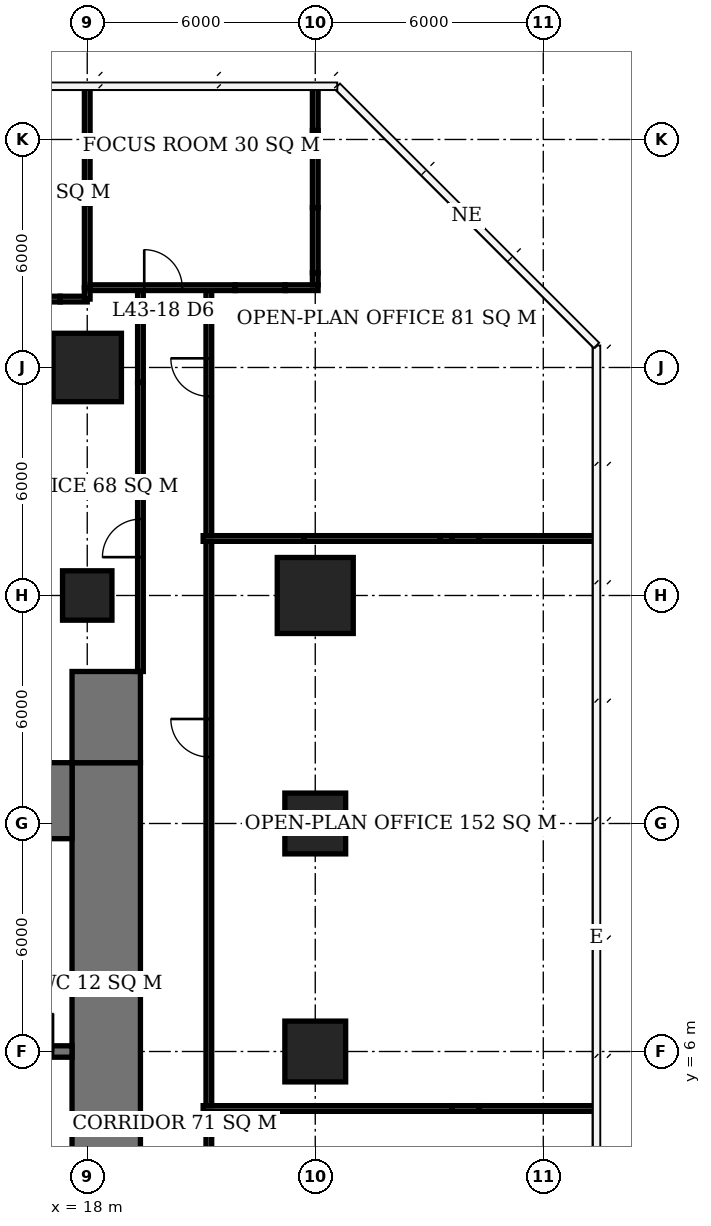
"""IFC4 building model, lengths in metres.
Left out: names, types, materials, properties, quantities, classifications, styles, units other than length and angle.
Written with IfcOpenShell. Run it as: python <this file> out.ifc"""

import sys

from ifc_helpers import new_model, si_unit, direction, frame, frame_2d, origin, origin_2d, place, context, subcontext, project, spatial, rectangle, extrude, element, fill, save


model = new_model("IFC4")
c1 = context("Model", 3, precision=1e-05, world=origin(), true_north=direction((0.0, 1.0)))
c2 = subcontext(c1, "Body", "Model", "MODEL_VIEW")
j1 = project(units=[si_unit("LENGTHUNIT", "METRE"), si_unit("PLANEANGLEUNIT", "RADIAN")], contexts=[c1])
p1 = place(None, origin())
s1 = spatial("IfcSite", under=j1, at=p1, CompositionType="ELEMENT")
p2 = place(p1, origin())
s2 = spatial("IfcBuilding", under=s1, at=p2, CompositionType="ELEMENT")
p3 = place(p2, frame((0.0, 0.0, 177.2)))
s3 = spatial("IfcBuildingStorey", under=s2, at=p3, CompositionType="ELEMENT", Elevation=177.2)
p4 = place(p3, frame((18.0, 18.0, 0.0), z_axis=(0.0, 0.0, 1.0), x_axis=(1.0, 0.0, 0.0)))
e1 = element("IfcColumn", 1, at=p4, inside=s3, PredefinedType="COLUMN", context=c2, shape_type="SweptSolid", body=[
    extrude(rectangle(XDim=1.3, YDim=1.3, at=origin_2d()), origin(), (0.0, 0.0, 1.0), 3.9),
])
p5 = place(p3, frame((18.0, 24.0, 0.0), z_axis=(0.0, 0.0, 1.0), x_axis=(1.0, 0.0, 0.0)))
e2 = element("IfcColumn", 2, at=p5, inside=s3, PredefinedType="COLUMN", context=c2, shape_type="SweptSolid", body=[
    extrude(rectangle(XDim=1.8, YDim=1.8, at=origin_2d()), origin(), (0.0, 0.0, 1.0), 3.9),
])
for number, where, z_axis, x_axis in (
    (3, (24.0, 6.0, 0.0), (0.0, 0.0, 1.0), (1.0, 0.0, 0.0)),
    (4, (24.0, 12.0, 0.0), (0.0, 0.0, 1.0), (1.0, 0.0, 0.0)),
):
    element("IfcColumn", number, at=place(p3, frame(where, z_axis=z_axis, x_axis=x_axis)), inside=s3, PredefinedType="COLUMN", context=c2, shape_type="SweptSolid", body=[
        extrude(rectangle(XDim=1.6, YDim=1.6, at=origin_2d()), origin(), (0.0, 0.0, 1.0), 3.9),
    ])
p6 = place(p3, frame((24.0, 18.0, 0.0), z_axis=(0.0, 0.0, 1.0), x_axis=(1.0, 0.0, 0.0)))
e5 = element("IfcColumn", 5, at=p6, inside=s3, PredefinedType="COLUMN", context=c2, shape_type="SweptSolid", body=[
    extrude(rectangle(XDim=2.0, YDim=2.0, at=origin_2d()), origin(), (0.0, 0.0, 1.0), 3.9),
])
p7 = place(p3, frame((-5.6, 12.6, 0.0), z_axis=(0.0, 0.0, 1.0), x_axis=(1.0, 0.0, 0.0)))
e6 = element("IfcWall", 6, at=p7, inside=s3, PredefinedType="SHEAR", context=c2, shape_type="SweptSolid", body=[
    extrude(rectangle(XDim=23.2, YDim=2.0, at=frame_2d((11.6, 0.0))), origin(), (0.0, 0.0, 1.0), 3.9),
])
p8 = place(p3, frame((18.5, -7.6, 0.0), z_axis=(0.0, 0.0, 1.0), x_axis=(0.0, 1.0, 0.0)))
e7 = element("IfcWall", 7, at=p8, inside=s3, PredefinedType="SHEAR", context=c2, shape_type="SweptSolid", body=[
    extrude(rectangle(XDim=21.2, YDim=1.8, at=frame_2d((10.6, 0.0))), origin(), (0.0, 0.0, 1.0), 3.9),
])
p9 = place(p8, frame((9.2, 0.0, 0.0)))
e8 = element("IfcOpeningElement", 8, at=p9, cuts=e7, PredefinedType="OPENING", context=c2, shape_type="SweptSolid", body=[
    extrude(rectangle(XDim=1.8, YDim=2.4, at=frame_2d((0.9, 1.2))), frame((0.0, 0.91, 0.0), z_axis=(0.0, -1.0, 0.0), x_axis=(1.0, 0.0, 0.0)), (0.0, 0.0, 1.0), 1.82),
])
p10 = place(p3, frame((18.5, 13.6, 0.0), z_axis=(0.0, 0.0, 1.0), x_axis=(0.0, 1.0, 0.0)))
e9 = element("IfcWall", 9, at=p10, inside=s3, PredefinedType="SHEAR", context=c2, shape_type="SweptSolid", body=[
    extrude(rectangle(XDim=2.4, YDim=1.8, at=frame_2d((1.2, 0.0))), origin(), (0.0, 0.0, 1.0), 3.9),
])
p11 = place(p3, frame((-0.15, 6.0, 0.0), z_axis=(0.0, 0.0, 1.0), x_axis=(1.0, 0.0, 0.0)))
e10 = element("IfcWall", 10, at=p11, inside=s3, PredefinedType="SHEAR", context=c2, shape_type="SweptSolid", body=[
    extrude(rectangle(XDim=17.75, YDim=0.3, at=frame_2d((8.875, 0.0))), origin(), (0.0, 0.0, 1.0), 3.9),
])
p12 = place(p11, frame((13.15, 0.0, 0.0)))
e11 = element("IfcOpeningElement", 11, at=p12, cuts=e10, PredefinedType="OPENING", context=c2, shape_type="SweptSolid", body=[
    extrude(rectangle(XDim=0.9, YDim=2.1, at=frame_2d((0.45, 1.05))), frame((0.0, 0.16, 0.0), z_axis=(0.0, -1.0, 0.0), x_axis=(1.0, 0.0, 0.0)), (0.0, 0.0, 1.0), 0.32),
])
p13 = place(p11, frame((16.25, 0.0, 0.0)))
e12 = element("IfcOpeningElement", 12, at=p13, cuts=e10, PredefinedType="OPENING", context=c2, shape_type="SweptSolid", body=[
    extrude(rectangle(XDim=1.0, YDim=2.1, at=frame_2d((0.5, 1.05))), frame((0.0, 0.16, 0.0), z_axis=(0.0, -1.0, 0.0), x_axis=(1.0, 0.0, 0.0)), (0.0, 0.0, 1.0), 0.32),
])
p14 = place(p11, frame((7.25, 0.0, 0.0)))
e13 = element("IfcOpeningElement", 13, at=p14, cuts=e10, PredefinedType="OPENING", context=c2, shape_type="SweptSolid", body=[
    extrude(rectangle(XDim=1.0, YDim=2.1, at=frame_2d((0.5, 1.05))), frame((0.0, 0.16, 0.0), z_axis=(0.0, -1.0, 0.0), x_axis=(1.0, 0.0, 0.0)), (0.0, 0.0, 1.0), 0.32),
])
p15 = place(p11, frame((1.1, 0.0, 0.0)))
e14 = element("IfcOpeningElement", 14, at=p15, cuts=e10, PredefinedType="OPENING", context=c2, shape_type="SweptSolid", body=[
    extrude(rectangle(XDim=1.1, YDim=2.1, at=frame_2d((0.55, 1.05))), frame((0.0, 0.16, 0.0), z_axis=(0.0, -1.0, 0.0), x_axis=(1.0, 0.0, 0.0)), (0.0, 0.0, 1.0), 0.32),
])
p16 = place(p11, frame((4.1, 0.0, 0.0)))
e15 = element("IfcOpeningElement", 15, at=p16, cuts=e10, PredefinedType="OPENING", context=c2, shape_type="SweptSolid", body=[
    extrude(rectangle(XDim=1.1, YDim=2.1, at=frame_2d((0.55, 1.05))), frame((0.0, 0.16, 0.0), z_axis=(0.0, -1.0, 0.0), x_axis=(1.0, 0.0, 0.0)), (0.0, 0.0, 1.0), 0.32),
])
p17 = place(p3, frame((12.71, 25.8, 0.0), z_axis=(0.0, 0.0, 1.0), x_axis=(1.0, 0.0, 0.0)))
e16 = element("IfcWall", 16, at=p17, inside=s3, PredefinedType="PARTITIONING", context=c2, shape_type="SweptSolid", body=[
    extrude(rectangle(XDim=4.58, YDim=0.15, at=frame_2d((2.29, 0.0))), origin(), (0.0, 0.0, 1.0), 3.65),
])
p18 = place(p17, frame((1.79, 0.0, 0.0)))
e17 = element("IfcOpeningElement", 17, at=p18, cuts=e16, PredefinedType="OPENING", context=c2, shape_type="SweptSolid", body=[
    extrude(rectangle(XDim=1.0, YDim=2.1, at=frame_2d((0.5, 1.05))), frame((0.0, 0.085, 0.0), z_axis=(0.0, -1.0, 0.0), x_axis=(1.0, 0.0, 0.0)), (0.0, 0.0, 1.0), 0.17),
])
p19 = place(p3, frame((17.29, 25.8, 0.0), z_axis=(0.0, 0.0, 1.0), x_axis=(1.0, 0.0, 0.0)))
e18 = element("IfcWall", 18, at=p19, inside=s3, PredefinedType="PARTITIONING", context=c2, shape_type="SweptSolid", body=[
    extrude(rectangle(XDim=0.71, YDim=0.15, at=frame_2d((0.355, 0.0))), origin(), (0.0, 0.0, 1.0), 2.65),
])
p20 = place(p3, frame((18.075, 26.1, 0.0), z_axis=(0.0, 0.0, 1.0), x_axis=(1.0, 0.0, 0.0)))
e19 = element("IfcWall", 19, at=p20, inside=s3, PredefinedType="PARTITIONING", context=c2, shape_type="SweptSolid", body=[
    extrude(rectangle(XDim=3.817, YDim=0.15, at=frame_2d((1.909, 0.0))), origin(), (0.0, 0.0, 1.0), 2.65),
])
p21 = place(p20, frame((1.425, 0.0, 0.0)))
e20 = element("IfcOpeningElement", 20, at=p21, cuts=e19, PredefinedType="OPENING", context=c2, shape_type="SweptSolid", body=[
    extrude(rectangle(XDim=1.0, YDim=2.1, at=frame_2d((0.5, 1.05))), frame((0.0, 0.085, 0.0), z_axis=(0.0, -1.0, 0.0), x_axis=(1.0, 0.0, 0.0)), (0.0, 0.0, 1.0), 0.17),
])
p22 = place(p3, frame((21.892, 26.1, 0.0), z_axis=(0.0, 0.0, 1.0), x_axis=(1.0, 0.0, 0.0)))
e21 = element("IfcWall", 21, at=p22, inside=s3, PredefinedType="PARTITIONING", context=c2, shape_type="SweptSolid", body=[
    extrude(rectangle(XDim=1.318, YDim=0.15, at=frame_2d((0.659, 0.0))), origin(), (0.0, 0.0, 1.0), 3.65),
])
p23 = place(p3, frame((23.21, 26.1, 0.0), z_axis=(0.0, 0.0, 1.0), x_axis=(1.0, 0.0, 0.0)))
e22 = element("IfcWall", 22, at=p23, inside=s3, PredefinedType="PARTITIONING", context=c2, shape_type="SweptSolid", body=[
    extrude(rectangle(XDim=0.865, YDim=0.15, at=frame_2d((0.433, 0.0))), origin(), (0.0, 0.0, 1.0), 2.65),
])
p24 = place(p3, frame((18.0, 25.8, 0.0), z_axis=(0.0, 0.0, 1.0), x_axis=(0.0, 1.0, 0.0)))
e23 = element("IfcWall", 23, at=p24, inside=s3, PredefinedType="PARTITIONING", context=c2, shape_type="SweptSolid", body=[
    extrude(rectangle(XDim=0.3, YDim=0.15, at=frame_2d((0.15, 0.0))), origin(), (0.0, 0.0, 1.0), 2.65),
])
p25 = place(p3, frame((18.0, 26.1, 0.0), z_axis=(0.0, 0.0, 1.0), x_axis=(0.0, 1.0, 0.0)))
e24 = element("IfcWall", 24, at=p25, inside=s3, PredefinedType="PARTITIONING", context=c2, shape_type="SweptSolid", body=[
    extrude(rectangle(XDim=2.21, YDim=0.15, at=frame_2d((1.105, 0.0))), origin(), (0.0, 0.0, 1.0), 2.65),
])
p26 = place(p3, frame((18.0, 28.31, 0.0), z_axis=(0.0, 0.0, 1.0), x_axis=(0.0, 1.0, 0.0)))
e25 = element("IfcWall", 25, at=p26, inside=s3, PredefinedType="PARTITIONING", context=c2, shape_type="SweptSolid", body=[
    extrude(rectangle(XDim=3.09, YDim=0.15, at=frame_2d((1.545, 0.0))), origin(), (0.0, 0.0, 1.0), 3.65),
])
p27 = place(p3, frame((24.0, 26.175, 0.0), z_axis=(0.0, 0.0, 1.0), x_axis=(0.0, 1.0, 0.0)))
e26 = element("IfcWall", 26, at=p27, inside=s3, PredefinedType="PARTITIONING", context=c2, shape_type="SweptSolid", body=[
    extrude(rectangle(XDim=0.315, YDim=0.15, at=frame_2d((0.157, 0.0))), origin(), (0.0, 0.0, 1.0), 2.65),
])
p28 = place(p3, frame((24.0, 26.49, 0.0), z_axis=(0.0, 0.0, 1.0), x_axis=(0.0, 1.0, 0.0)))
e27 = element("IfcWall", 27, at=p28, inside=s3, PredefinedType="PARTITIONING", context=c2, shape_type="SweptSolid", body=[
    extrude(rectangle(XDim=1.718, YDim=0.15, at=frame_2d((0.859, 0.0))), origin(), (0.0, 0.0, 1.0), 3.65),
])
p29 = place(p3, frame((24.0, 28.208, 0.0), z_axis=(0.0, 0.0, 1.0), x_axis=(0.0, 1.0, 0.0)))
e28 = element("IfcWall", 28, at=p29, inside=s3, PredefinedType="PARTITIONING", context=c2, shape_type="SweptSolid", body=[
    extrude(rectangle(XDim=2.029, YDim=0.15, at=frame_2d((1.015, 0.0))), origin(), (0.0, 0.0, 1.0), 2.65),
])
p30 = place(p3, frame((24.0, 30.237, 0.0), z_axis=(0.0, 0.0, 1.0), x_axis=(0.0, 1.0, 0.0)))
e29 = element("IfcWall", 29, at=p30, inside=s3, PredefinedType="PARTITIONING", context=c2, shape_type="SweptSolid", body=[
    extrude(rectangle(XDim=1.163, YDim=0.15, at=frame_2d((0.582, 0.0))), origin(), (0.0, 0.0, 1.0), 3.65),
])
p31 = place(p3, frame((19.4, 16.0, 0.0), z_axis=(0.0, 0.0, 1.0), x_axis=(0.0, 1.0, 0.0)))
e30 = element("IfcWall", 30, at=p31, inside=s3, PredefinedType="PARTITIONING", context=c2, shape_type="SweptSolid", body=[
    extrude(rectangle(XDim=7.608, YDim=0.15, at=frame_2d((3.804, 0.0))), origin(), (0.0, 0.0, 1.0), 3.65),
])
p32 = place(p31, frame((3.009, 0.0, 0.0)))
e31 = element("IfcOpeningElement", 31, at=p32, cuts=e30, PredefinedType="OPENING", context=c2, shape_type="SweptSolid", body=[
    extrude(rectangle(XDim=1.0, YDim=2.1, at=frame_2d((0.5, 1.05))), frame((0.0, 0.085, 0.0), z_axis=(0.0, -1.0, 0.0), x_axis=(1.0, 0.0, 0.0)), (0.0, 0.0, 1.0), 0.17),
])
p33 = place(p3, frame((19.4, 23.608, 0.0), z_axis=(0.0, 0.0, 1.0), x_axis=(0.0, 1.0, 0.0)))
e32 = element("IfcWall", 32, at=p33, inside=s3, PredefinedType="PARTITIONING", context=c2, shape_type="SweptSolid", body=[
    extrude(rectangle(XDim=2.417, YDim=0.15, at=frame_2d((1.208, 0.0))), origin(), (0.0, 0.0, 1.0), 2.65),
])
p34 = place(p3, frame((21.2, -13.4, 0.0), z_axis=(0.0, 0.0, 1.0), x_axis=(0.0, 1.0, 0.0)))
e33 = element("IfcWall", 33, at=p34, inside=s3, PredefinedType="PARTITIONING", context=c2, shape_type="SweptSolid", body=[
    extrude(rectangle(XDim=17.825, YDim=0.15, at=frame_2d((8.913, 0.0))), origin(), (0.0, 0.0, 1.0), 3.65),
])
p35 = place(p34, frame((11.17, 0.0, 0.0)))
e34 = element("IfcOpeningElement", 34, at=p35, cuts=e33, PredefinedType="OPENING", context=c2, shape_type="SweptSolid", body=[
    extrude(rectangle(XDim=1.0, YDim=2.1, at=frame_2d((0.5, 1.05))), frame((0.0, 0.085, 0.0), z_axis=(0.0, -1.0, 0.0), x_axis=(1.0, 0.0, 0.0)), (0.0, 0.0, 1.0), 0.17),
])
p36 = place(p3, frame((21.2, 4.575, 0.0), z_axis=(0.0, 0.0, 1.0), x_axis=(0.0, 1.0, 0.0)))
e35 = element("IfcWall", 35, at=p36, inside=s3, PredefinedType="PARTITIONING", context=c2, shape_type="SweptSolid", body=[
    extrude(rectangle(XDim=14.85, YDim=0.15, at=frame_2d((7.425, 0.0))), origin(), (0.0, 0.0, 1.0), 3.65),
])
p37 = place(p36, frame((9.175, 0.0, 0.0)))
e36 = element("IfcOpeningElement", 36, at=p37, cuts=e35, PredefinedType="OPENING", context=c2, shape_type="SweptSolid", body=[
    extrude(rectangle(XDim=1.0, YDim=2.1, at=frame_2d((0.5, 1.05))), frame((0.0, 0.085, 0.0), z_axis=(0.0, -1.0, 0.0), x_axis=(1.0, 0.0, 0.0)), (0.0, 0.0, 1.0), 0.17),
])
p38 = place(p3, frame((21.05, 4.5, 0.0), z_axis=(0.0, 0.0, 1.0), x_axis=(1.0, 0.0, 0.0)))
e37 = element("IfcWall", 37, at=p38, inside=s3, PredefinedType="PARTITIONING", context=c2, shape_type="SweptSolid", body=[
    extrude(rectangle(XDim=6.54, YDim=0.15, at=frame_2d((3.27, 0.0))), origin(), (0.0, 0.0, 1.0), 3.65),
])
p39 = place(p3, frame((27.59, 4.5, 0.0), z_axis=(0.0, 0.0, 1.0), x_axis=(1.0, 0.0, 0.0)))
e38 = element("IfcWall", 38, at=p39, inside=s3, PredefinedType="PARTITIONING", context=c2, shape_type="SweptSolid", body=[
    extrude(rectangle(XDim=0.72, YDim=0.15, at=frame_2d((0.36, 0.0))), origin(), (0.0, 0.0, 1.0), 2.65),
])
p40 = place(p3, frame((28.31, 4.5, 0.0), z_axis=(0.0, 0.0, 1.0), x_axis=(1.0, 0.0, 0.0)))
e39 = element("IfcWall", 39, at=p40, inside=s3, PredefinedType="PARTITIONING", context=c2, shape_type="SweptSolid", body=[
    extrude(rectangle(XDim=3.09, YDim=0.15, at=frame_2d((1.545, 0.0))), origin(), (0.0, 0.0, 1.0), 3.65),
])
p41 = place(p3, frame((21.2, 19.575, 0.0), z_axis=(0.0, 0.0, 1.0), x_axis=(0.0, 1.0, 0.0)))
e40 = element("IfcWall", 40, at=p41, inside=s3, PredefinedType="PARTITIONING", context=c2, shape_type="SweptSolid", body=[
    extrude(rectangle(XDim=5.833, YDim=0.15, at=frame_2d((2.917, 0.0))), origin(), (0.0, 0.0, 1.0), 3.65),
])
p42 = place(p41, frame((3.666, 0.0, 0.0)))
e41 = element("IfcOpeningElement", 41, at=p42, cuts=e40, PredefinedType="OPENING", context=c2, shape_type="SweptSolid", body=[
    extrude(rectangle(XDim=1.0, YDim=2.1, at=frame_2d((0.5, 1.05))), frame((0.0, 0.085, 0.0), z_axis=(0.0, -1.0, 0.0), x_axis=(1.0, 0.0, 0.0)), (0.0, 0.0, 1.0), 0.17),
])
p43 = place(p3, frame((21.2, 25.408, 0.0), z_axis=(0.0, 0.0, 1.0), x_axis=(0.0, 1.0, 0.0)))
e42 = element("IfcWall", 42, at=p43, inside=s3, PredefinedType="PARTITIONING", context=c2, shape_type="SweptSolid", body=[
    extrude(rectangle(XDim=0.617, YDim=0.15, at=frame_2d((0.309, 0.0))), origin(), (0.0, 0.0, 1.0), 2.65),
])
p44 = place(p3, frame((21.05, 19.5, 0.0), z_axis=(0.0, 0.0, 1.0), x_axis=(1.0, 0.0, 0.0)))
e43 = element("IfcWall", 43, at=p44, inside=s3, PredefinedType="PARTITIONING", context=c2, shape_type="SweptSolid", body=[
    extrude(rectangle(XDim=2.658, YDim=0.15, at=frame_2d((1.329, 0.0))), origin(), (0.0, 0.0, 1.0), 3.65),
])
p45 = place(p3, frame((23.708, 19.5, 0.0), z_axis=(0.0, 0.0, 1.0), x_axis=(1.0, 0.0, 0.0)))
e44 = element("IfcWall", 44, at=p45, inside=s3, PredefinedType="PARTITIONING", context=c2, shape_type="SweptSolid", body=[
    extrude(rectangle(XDim=3.584, YDim=0.15, at=frame_2d((1.792, 0.0))), origin(), (0.0, 0.0, 1.0), 2.65),
])
p46 = place(p3, frame((27.292, 19.5, 0.0), z_axis=(0.0, 0.0, 1.0), x_axis=(1.0, 0.0, 0.0)))
e45 = element("IfcWall", 45, at=p46, inside=s3, PredefinedType="PARTITIONING", context=c2, shape_type="SweptSolid", body=[
    extrude(rectangle(XDim=0.298, YDim=0.15, at=frame_2d((0.149, 0.0))), origin(), (0.0, 0.0, 1.0), 3.65),
])
p47 = place(p3, frame((27.59, 19.5, 0.0), z_axis=(0.0, 0.0, 1.0), x_axis=(1.0, 0.0, 0.0)))
e46 = element("IfcWall", 46, at=p47, inside=s3, PredefinedType="PARTITIONING", context=c2, shape_type="SweptSolid", body=[
    extrude(rectangle(XDim=0.72, YDim=0.15, at=frame_2d((0.36, 0.0))), origin(), (0.0, 0.0, 1.0), 2.65),
])
p48 = place(p3, frame((28.31, 19.5, 0.0), z_axis=(0.0, 0.0, 1.0), x_axis=(1.0, 0.0, 0.0)))
e47 = element("IfcWall", 47, at=p48, inside=s3, PredefinedType="PARTITIONING", context=c2, shape_type="SweptSolid", body=[
    extrude(rectangle(XDim=3.09, YDim=0.15, at=frame_2d((1.545, 0.0))), origin(), (0.0, 0.0, 1.0), 3.65),
])
p49 = place(p13, origin())
e48 = element("IfcDoor", 48, at=p49, inside=s3, OperationType="SINGLE_SWING_RIGHT", PredefinedType="DOOR", context=c2, shape_type="SweptSolid", body=[
    extrude(rectangle(XDim=1.0, YDim=2.1, at=frame_2d((0.5, 1.05))), frame((0.0, 0.025, 0.0), z_axis=(0.0, -1.0, 0.0), x_axis=(1.0, 0.0, 0.0)), (0.0, 0.0, 1.0), 0.05),
])
fill(e12, e48)
p50 = place(p21, origin())
e49 = element("IfcDoor", 49, at=p50, inside=s3, OperationType="SINGLE_SWING_LEFT", PredefinedType="DOOR", context=c2, shape_type="SweptSolid", body=[
    extrude(rectangle(XDim=1.0, YDim=2.1, at=frame_2d((0.5, 1.05))), frame((0.0, 0.025, 0.0), z_axis=(0.0, -1.0, 0.0), x_axis=(1.0, 0.0, 0.0)), (0.0, 0.0, 1.0), 0.05),
])
fill(e20, e49)
p51 = place(p37, origin())
e50 = element("IfcDoor", 50, at=p51, inside=s3, OperationType="SINGLE_SWING_RIGHT", PredefinedType="DOOR", context=c2, shape_type="SweptSolid", body=[
    extrude(rectangle(XDim=1.0, YDim=2.1, at=frame_2d((0.5, 1.05))), frame((0.0, 0.025, 0.0), z_axis=(0.0, -1.0, 0.0), x_axis=(1.0, 0.0, 0.0)), (0.0, 0.0, 1.0), 0.05),
])
fill(e36, e50)
p52 = place(p32, origin())
e51 = element("IfcDoor", 51, at=p52, inside=s3, OperationType="SINGLE_SWING_LEFT", PredefinedType="DOOR", context=c2, shape_type="SweptSolid", body=[
    extrude(rectangle(XDim=1.0, YDim=2.1, at=frame_2d((0.5, 1.05))), frame((0.0, 0.025, 0.0), z_axis=(0.0, -1.0, 0.0), x_axis=(1.0, 0.0, 0.0)), (0.0, 0.0, 1.0), 0.05),
])
fill(e31, e51)
p53 = place(p42, origin())
e52 = element("IfcDoor", 52, at=p53, inside=s3, OperationType="SINGLE_SWING_RIGHT", PredefinedType="DOOR", context=c2, shape_type="SweptSolid", body=[
    extrude(rectangle(XDim=1.0, YDim=2.1, at=frame_2d((0.5, 1.05))), frame((0.0, 0.025, 0.0), z_axis=(0.0, -1.0, 0.0), x_axis=(1.0, 0.0, 0.0)), (0.0, 0.0, 1.0), 0.05),
])
fill(e41, e52)
save(model, sys.argv[1])
